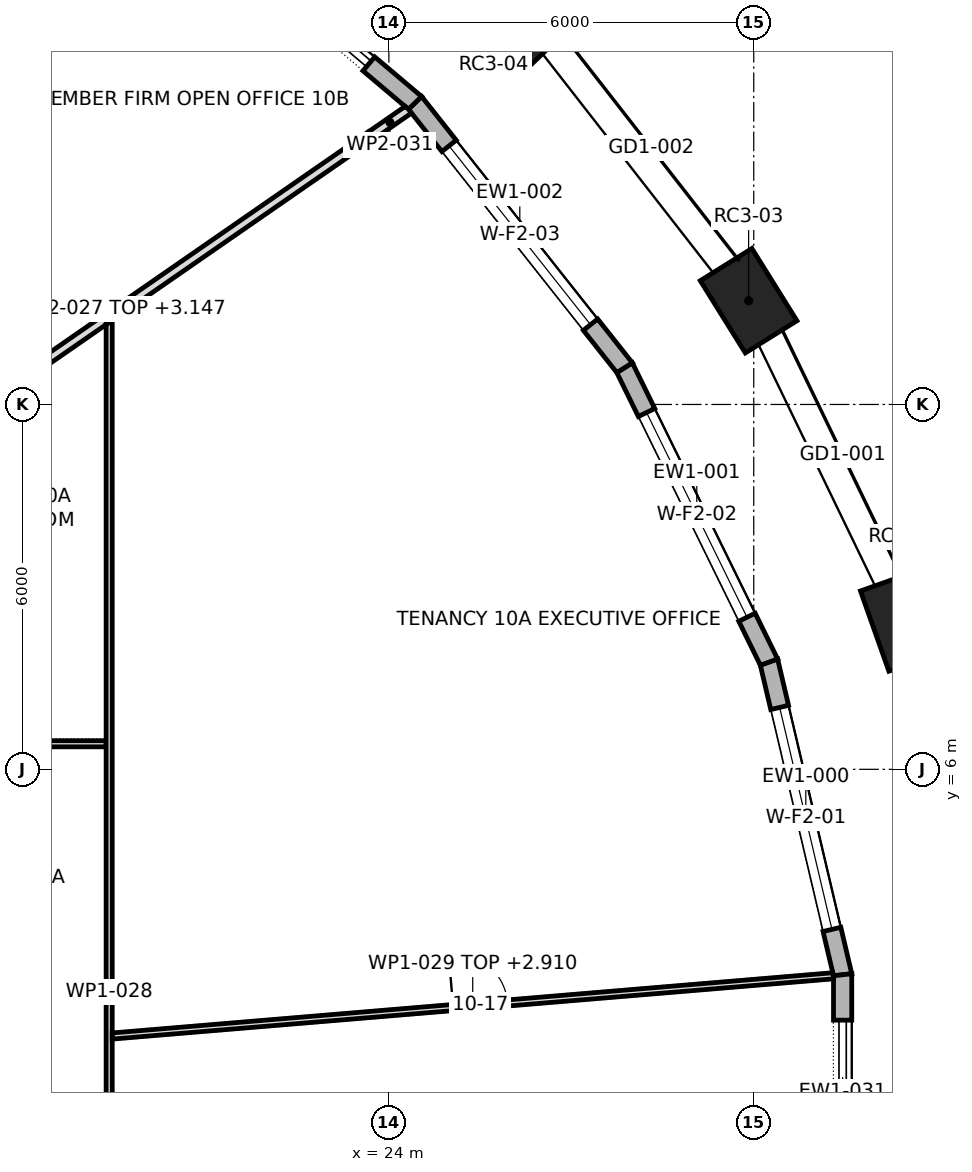
"""IFC4 building model, lengths in metres.
Left out: names, types, materials, properties, quantities, classifications, styles, units other than length and angle.
Written with IfcOpenShell. Run it as: python <this file> out.ifc"""

import sys

from ifc_helpers import new_model, si_unit, direction, frame, frame_2d, origin, origin_2d, place, context, subcontext, project, spatial, polyline, rectangle, outline, extrude, element, fill, save


model = new_model("IFC4")
c1 = context("Model", 3, precision=1e-05, world=origin(), true_north=direction((0.0, 1.0)))
c2 = subcontext(c1, "Body", "Model", "MODEL_VIEW")
j1 = project(units=[si_unit("LENGTHUNIT", "METRE"), si_unit("PLANEANGLEUNIT", "RADIAN")], contexts=[c1])
p1 = place(None, origin())
s1 = spatial("IfcSite", under=j1, at=p1, CompositionType="ELEMENT")
p2 = place(p1, origin())
s2 = spatial("IfcBuilding", under=s1, at=p2, CompositionType="ELEMENT")
p3 = place(p2, frame((0.0, 0.0, 150.7)))
s3 = spatial("IfcBuildingStorey", under=s2, at=p3, CompositionType="ELEMENT", Elevation=150.7)
for number, where, z_axis, x_axis in (
    (1, (32.46, 8.44, 0.0), (0.0, 0.0, 1.0), (-0.334, 0.943, 0.0)),
    (2, (29.916, 13.706, 0.0), (0.0, 0.0, 1.0), (-0.529, 0.849, 0.0)),
    (3, (26.221, 18.445, 0.0), (0.0, 0.0, 1.0), (-0.692, 0.722, 0.0)),
):
    element("IfcColumn", number, at=place(p3, frame(where, z_axis=z_axis, x_axis=x_axis)), inside=s3, PredefinedType="COLUMN", context=c2, shape_type="SweptSolid", body=[
        extrude(rectangle(XDim=1.4, YDim=1.0, at=origin_2d()), origin(), (0.0, 0.0, 1.0), 4.2),
    ])
p4 = place(p3, frame((31.462, 2.622, 0.0), z_axis=(0.0, 0.0, 1.0), x_axis=(-0.229289208312, 0.973358340464, 0.0)))
e4 = element("IfcWall", 4, at=p4, inside=s3, PredefinedType="STANDARD", context=c2, shape_type="SweptSolid", body=[
    extrude(outline(polyline([(-0.017, -0.15), (5.299, -0.15), (5.265, 0.15), (0.017, 0.15), (-0.017, -0.15)])), origin(), (0.0, 0.0, 1.0), 3.9),
])
p5 = place(p4, frame((0.766, 0.0, 0.6)))
e5 = element("IfcOpeningElement", 5, at=p5, cuts=e4, PredefinedType="OPENING", context=c2, shape_type="SweptSolid", body=[
    extrude(rectangle(XDim=3.75, YDim=2.85, at=frame_2d((1.875, 1.425))), frame((0.0, 0.162, 0.0), z_axis=(0.0, -1.0, 0.0), x_axis=(1.0, 0.0, 0.0)), (0.0, 0.0, 1.0), 0.324),
])
p6 = place(p3, frame((30.25, 7.763, 0.0), z_axis=(0.0, 0.0, 1.0), x_axis=(-0.440373354088, 0.897814740918, 0.0)))
e6 = element("IfcWall", 6, at=p6, inside=s3, PredefinedType="STANDARD", context=c2, shape_type="SweptSolid", body=[
    extrude(outline(polyline([(-0.017, -0.15), (5.409, -0.15), (5.376, 0.15), (0.017, 0.15), (-0.017, -0.15)])), origin(), (0.0, 0.0, 1.0), 3.9),
])
p7 = place(p6, frame((0.821, 0.0, 0.6)))
e7 = element("IfcOpeningElement", 7, at=p7, cuts=e6, PredefinedType="OPENING", context=c2, shape_type="SweptSolid", body=[
    extrude(rectangle(XDim=3.75, YDim=2.85, at=frame_2d((1.875, 1.425))), frame((0.0, 0.162, 0.0), z_axis=(0.0, -1.0, 0.0), x_axis=(1.0, 0.0, 0.0)), (0.0, 0.0, 1.0), 0.324),
])
p8 = place(p3, frame((27.876, 12.605, 0.0), z_axis=(0.0, 0.0, 1.0), x_axis=(-0.620520511988, 0.784190215574, 0.0)))
e8 = element("IfcWall", 8, at=p8, inside=s3, PredefinedType="STANDARD", context=c2, shape_type="SweptSolid", body=[
    extrude(outline(polyline([(-0.016, -0.15), (5.569, -0.15), (5.538, 0.15), (0.016, 0.15), (-0.016, -0.15)])), origin(), (0.0, 0.0, 1.0), 3.9),
])
p9 = place(p8, frame((0.902, 0.0, 0.6)))
e9 = element("IfcOpeningElement", 9, at=p9, cuts=e8, PredefinedType="OPENING", context=c2, shape_type="SweptSolid", body=[
    extrude(rectangle(XDim=3.75, YDim=2.85, at=frame_2d((1.875, 1.425))), frame((0.0, 0.162, 0.0), z_axis=(0.0, -1.0, 0.0), x_axis=(1.0, 0.0, 0.0)), (0.0, 0.0, 1.0), 0.324),
])
p10 = place(p3, frame((24.43, 16.96, 0.0), z_axis=(0.0, 0.0, 1.0), x_axis=(-0.764047627809, 0.64515984255, 0.0)))
e10 = element("IfcWall", 10, at=p10, inside=s3, PredefinedType="STANDARD", context=c2, shape_type="SweptSolid", body=[
    extrude(outline(polyline([(-0.015, -0.15), (5.752, -0.15), (5.723, 0.15), (0.015, 0.15), (-0.015, -0.15)])), origin(), (0.0, 0.0, 1.0), 3.9),
])
p11 = place(p10, frame((0.994, 0.0, 0.0)))
e11 = element("IfcOpeningElement", 11, at=p11, cuts=e10, PredefinedType="OPENING", context=c2, shape_type="SweptSolid", body=[
    extrude(rectangle(XDim=3.75, YDim=3.45, at=frame_2d((1.875, 1.725))), frame((0.0, 0.162, 0.0), z_axis=(0.0, -1.0, 0.0), x_axis=(1.0, 0.0, 0.0)), (0.0, 0.0, 1.0), 0.324),
])
p12 = place(p3, frame((31.462, -2.622, 0.0), z_axis=(0.0, 0.0, 1.0), x_axis=(0.0, 1.0, 0.0)))
e12 = element("IfcWall", 12, at=p12, inside=s3, PredefinedType="STANDARD", context=c2, shape_type="SweptSolid", body=[
    extrude(outline(polyline([(-0.017, -0.15), (5.26, -0.15), (5.226, 0.15), (0.017, 0.15), (-0.017, -0.15)])), origin(), (0.0, 0.0, 1.0), 3.9),
])
p13 = place(p12, frame((0.747, 0.0, 0.0)))
e13 = element("IfcOpeningElement", 13, at=p13, cuts=e12, PredefinedType="OPENING", context=c2, shape_type="SweptSolid", body=[
    extrude(rectangle(XDim=3.75, YDim=3.45, at=frame_2d((1.875, 1.725))), frame((0.0, 0.162, 0.0), z_axis=(0.0, -1.0, 0.0), x_axis=(1.0, 0.0, 0.0)), (0.0, 0.0, 1.0), 0.324),
])
p14 = place(p3, frame((15.475, 6.42, 0.0), z_axis=(0.0, 0.0, 1.0), x_axis=(1.0, 0.0, 0.0)))
e14 = element("IfcWall", 14, at=p14, inside=s3, PredefinedType="PARTITIONING", context=c2, shape_type="SweptSolid", body=[
    extrude(rectangle(XDim=3.875, YDim=0.1, at=frame_2d((1.938, 0.0))), origin(), (0.0, 0.0, 1.0), 3.9),
])
p15 = place(p3, frame((15.433, 10.692, 0.0), z_axis=(0.0, 0.0, 1.0), x_axis=(0.822108408401, 0.569330980042, 0.0)))
e15 = element("IfcWall", 15, at=p15, inside=s3, PredefinedType="PARTITIONING", context=c2, shape_type="SweptSolid", body=[
    extrude(outline(polyline([(0.0, -0.075), (1.571, -0.075), (3.142, -0.075), (4.713, -0.075), (4.715, -0.072), (4.719, -0.075), (6.503, -0.075), (8.288, -0.075), (10.072, -0.075), (10.072, 0.075), (8.078, 0.075), (6.084, 0.075), (4.091, 0.075), (2.097, 0.075), (0.104, 0.075), (0.0, -0.074), (0.0, -0.075)])), origin(), (0.0, 0.0, 1.0), 3.147),
])
p16 = place(p3, frame((19.4, -8.697, 0.0), z_axis=(0.0, 0.0, 1.0), x_axis=(0.0, 1.0, 0.0)))
e16 = element("IfcWall", 16, at=p16, inside=s3, PredefinedType="PARTITIONING", context=c2, shape_type="SweptSolid", body=[
    extrude(outline(polyline([(22.08, -0.05), (22.08, -0.05), (22.01, 0.05), (20.3, 0.05), (18.589, 0.05), (16.877, 0.05), (15.167, 0.05), (15.167, 0.05), (15.067, 0.05), (15.067, 0.05), (13.262, 0.05), (11.458, 0.05), (9.655, 0.05), (7.851, 0.05), (6.047, 0.05), (6.047, 0.05), (5.947, 0.05), (5.947, 0.05), (3.979, 0.05), (2.012, 0.05), (0.045, 0.05), (0.0, -0.049), (0.0, -0.05), (1.84, -0.05), (3.68, -0.05), (5.52, -0.05), (7.36, -0.05), (9.2, -0.05), (11.04, -0.05), (12.88, -0.05), (14.72, -0.05), (16.56, -0.05), (18.4, -0.05), (20.24, -0.05), (22.08, -0.05)])), origin(), (0.0, 0.0, 1.0), 3.9),
])
p17 = place(p16, frame((7.701, 0.0, 0.0)))
e17 = element("IfcOpeningElement", 17, at=p17, cuts=e16, PredefinedType="OPENING", context=c2, shape_type="SweptSolid", body=[
    extrude(rectangle(XDim=0.9, YDim=2.1, at=frame_2d((0.45, 1.05))), frame((0.0, 0.062, 0.0), z_axis=(0.0, -1.0, 0.0), x_axis=(1.0, 0.0, 0.0)), (0.0, 0.0, 1.0), 0.124),
])
p18 = place(p3, frame((19.446, 1.614, 0.0), z_axis=(0.0, 0.0, 1.0), x_axis=(0.996528479526, 0.083252564492, 0.0)))
e18 = element("IfcWall", 18, at=p18, inside=s3, PredefinedType="PARTITIONING", context=c2, shape_type="SweptSolid", body=[
    extrude(outline(polyline([(0.0, -0.05), (1.984, -0.05), (3.968, -0.05), (5.952, -0.05), (7.935, -0.05), (9.919, -0.05), (11.903, -0.05), (11.903, -0.05), (11.903, 0.027), (11.9, 0.05), (9.918, 0.05), (7.936, 0.05), (5.954, 0.05), (3.972, 0.05), (1.99, 0.05), (0.008, 0.05), (0.0, -0.05)])), origin(), (0.0, 0.0, 1.0), 2.91),
])
p19 = place(p18, frame((5.63, 0.0, 0.0)))
e19 = element("IfcOpeningElement", 19, at=p19, cuts=e18, PredefinedType="OPENING", context=c2, shape_type="SweptSolid", body=[
    extrude(rectangle(XDim=0.9, YDim=2.1, at=frame_2d((0.45, 1.05))), frame((0.0, 0.062, 0.0), z_axis=(0.0, -1.0, 0.0), x_axis=(1.0, 0.0, 0.0)), (0.0, 0.0, 1.0), 0.124),
])
p20 = place(p3, frame((23.713, 16.427, 0.0), z_axis=(0.0, 0.0, 1.0), x_axis=(0.822145264982, 0.569277755816, 0.0)))
e20 = element("IfcWall", 20, at=p20, inside=s3, PredefinedType="PARTITIONING", context=c2, shape_type="SweptSolid", body=[
    extrude(outline(polyline([(0.749, -0.075), (0.749, -0.072), (0.744, 0.006), (0.726, 0.075), (0.0, 0.075), (0.0, -0.075), (0.749, -0.075)])), origin(), (0.0, 0.0, 1.0), 3.9),
])
p21 = place(p5, origin())
e21 = element("IfcWindow", 21, at=p21, inside=s3, PartitioningType="TRIPLE_PANEL_VERTICAL", PredefinedType="WINDOW", context=c2, shape_type="SweptSolid", body=[
    extrude(rectangle(XDim=3.75, YDim=2.85, at=frame_2d((1.875, 1.425))), frame((0.0, 0.03, 0.0), z_axis=(0.0, -1.0, 0.0), x_axis=(1.0, 0.0, 0.0)), (0.0, 0.0, 1.0), 0.06),
])
fill(e5, e21)
p22 = place(p7, origin())
e22 = element("IfcWindow", 22, at=p22, inside=s3, PartitioningType="TRIPLE_PANEL_VERTICAL", PredefinedType="WINDOW", context=c2, shape_type="SweptSolid", body=[
    extrude(rectangle(XDim=3.75, YDim=2.85, at=frame_2d((1.875, 1.425))), frame((0.0, 0.03, 0.0), z_axis=(0.0, -1.0, 0.0), x_axis=(1.0, 0.0, 0.0)), (0.0, 0.0, 1.0), 0.06),
])
fill(e7, e22)
p23 = place(p9, origin())
e23 = element("IfcWindow", 23, at=p23, inside=s3, PartitioningType="TRIPLE_PANEL_VERTICAL", PredefinedType="WINDOW", context=c2, shape_type="SweptSolid", body=[
    extrude(rectangle(XDim=3.75, YDim=2.85, at=frame_2d((1.875, 1.425))), frame((0.0, 0.03, 0.0), z_axis=(0.0, -1.0, 0.0), x_axis=(1.0, 0.0, 0.0)), (0.0, 0.0, 1.0), 0.06),
])
fill(e9, e23)
p24 = place(p11, origin())
e24 = element("IfcDoor", 24, at=p24, inside=s3, OperationType="DOUBLE_DOOR_SLIDING", PredefinedType="DOOR", context=c2, shape_type="SweptSolid", body=[
    extrude(rectangle(XDim=3.75, YDim=3.45, at=frame_2d((1.875, 1.725))), frame((0.0, 0.025, 0.0), z_axis=(0.0, -1.0, 0.0), x_axis=(1.0, 0.0, 0.0)), (0.0, 0.0, 1.0), 0.05),
])
fill(e11, e24)
p25 = place(p13, origin())
e25 = element("IfcDoor", 25, at=p25, inside=s3, OperationType="DOUBLE_DOOR_SLIDING", PredefinedType="DOOR", context=c2, shape_type="SweptSolid", body=[
    extrude(rectangle(XDim=3.75, YDim=3.45, at=frame_2d((1.875, 1.725))), frame((0.0, 0.025, 0.0), z_axis=(0.0, -1.0, 0.0), x_axis=(1.0, 0.0, 0.0)), (0.0, 0.0, 1.0), 0.05),
])
fill(e13, e25)
p26 = place(p19, origin())
e26 = element("IfcDoor", 26, at=p26, inside=s3, OperationType="SINGLE_SWING_RIGHT", PredefinedType="DOOR", context=c2, shape_type="SweptSolid", body=[
    extrude(rectangle(XDim=0.9, YDim=2.1, at=frame_2d((0.45, 1.05))), frame((0.0, 0.025, 0.0), z_axis=(0.0, -1.0, 0.0), x_axis=(1.0, 0.0, 0.0)), (0.0, 0.0, 1.0), 0.05),
])
fill(e19, e26)
save(model, sys.argv[1])
